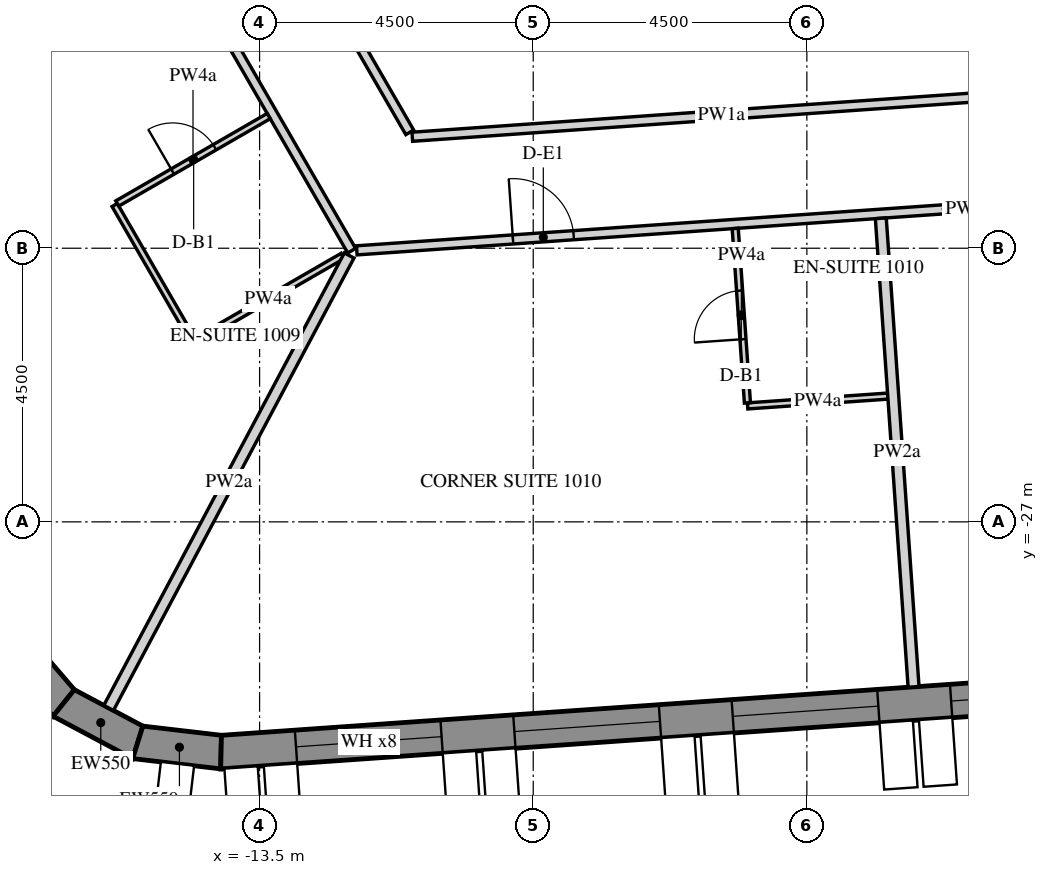
"""IFC4 building model, lengths in metres.
Left out: names, types, materials, properties, quantities, classifications, styles, units other than length and angle.
Written with IfcOpenShell. Run it as: python <this file> out.ifc"""

import sys

from ifc_helpers import new_model, si_unit, direction, frame, frame_2d, origin, place, context, subcontext, project, spatial, polyline, rectangle, outline, extrude, element, fill, save


model = new_model("IFC4")
c1 = context("Model", 3, precision=1e-05, world=origin(), true_north=direction((0.0, 1.0)))
c2 = subcontext(c1, "Body", "Model", "MODEL_VIEW")
j1 = project(units=[si_unit("LENGTHUNIT", "METRE"), si_unit("PLANEANGLEUNIT", "RADIAN")], contexts=[c1])
p1 = place(None, origin())
s1 = spatial("IfcSite", under=j1, at=p1, CompositionType="ELEMENT")
p2 = place(p1, origin())
s2 = spatial("IfcBuilding", under=s1, at=p2, CompositionType="ELEMENT")
p3 = place(p2, frame((0.0, 0.0, 135.0)))
s3 = spatial("IfcBuildingStorey", under=s2, at=p3, CompositionType="ELEMENT", Elevation=135.0)
p4 = place(p3, frame((-17.619, -28.932, -0.15), z_axis=(0.0, 0.0, 1.0), x_axis=(0.651621950847, -0.758543890078, 0.0)))
e1 = element("IfcWall", 1, at=p4, inside=s3, PredefinedType="SOLIDWALL", context=c2, shape_type="SweptSolid", body=[
    extrude(outline(polyline([(-0.026, -0.275), (1.431, -0.275), (1.327, 0.275), (0.026, 0.275), (-0.026, -0.275)])), origin(), (0.0, 0.0, 1.0), 3.9),
])
p5 = place(p3, frame((-16.721, -29.979, -0.15), z_axis=(0.0, 0.0, 1.0), x_axis=(0.882994189209, -0.469383917304, 0.0)))
e2 = element("IfcWall", 2, at=p5, inside=s3, PredefinedType="SOLIDWALL", context=c2, shape_type="SweptSolid", body=[
    extrude(outline(polyline([(-0.052, -0.275), (1.431, -0.275), (1.327, 0.275), (0.052, 0.275), (-0.052, -0.275)])), origin(), (0.0, 0.0, 1.0), 3.9),
])
p6 = place(p3, frame((-15.503, -30.626, -0.15), z_axis=(0.0, 0.0, 1.0), x_axis=(0.993232537394, -0.11614269956, 0.0)))
e3 = element("IfcWall", 3, at=p6, inside=s3, PredefinedType="SOLIDWALL", context=c2, shape_type="SweptSolid", body=[
    extrude(outline(polyline([(-0.052, -0.275), (1.405, -0.275), (1.353, 0.275), (0.052, 0.275), (-0.052, -0.275)])), origin(), (0.0, 0.0, 1.0), 3.9),
])
p7 = place(p3, frame((-14.134, -30.786, -0.15), z_axis=(0.0, 0.0, 1.0), x_axis=(0.997564037441, 0.069756657061, 0.0)))
e4 = element("IfcWall", 4, at=p7, inside=s3, PredefinedType="SOLIDWALL", context=c2, shape_type="SweptSolid", body=[
    extrude(outline(polyline([(-0.026, -0.275), (30.094, -0.275), (30.049, 0.275), (0.026, 0.275), (-0.026, -0.275)])), origin(), (0.0, 0.0, 1.0), 3.9),
])
p8 = place(p7, frame((1.236, 0.0, 1.05)))
e5 = element("IfcOpeningElement", 5, at=p8, cuts=e4, PredefinedType="OPENING", context=c2, shape_type="SweptSolid", body=[
    extrude(rectangle(XDim=2.4, YDim=2.4, at=frame_2d((1.2, 1.2))), frame((0.0, 0.285, 0.0), z_axis=(0.0, -1.0, 0.0), x_axis=(1.0, 0.0, 0.0)), (0.0, 0.0, 1.0), 0.57),
])
p9 = place(p7, frame((4.835, 0.0, 1.05)))
e6 = element("IfcOpeningElement", 6, at=p9, cuts=e4, PredefinedType="OPENING", context=c2, shape_type="SweptSolid", body=[
    extrude(rectangle(XDim=2.4, YDim=2.4, at=frame_2d((1.2, 1.2))), frame((0.0, 0.285, 0.0), z_axis=(0.0, -1.0, 0.0), x_axis=(1.0, 0.0, 0.0)), (0.0, 0.0, 1.0), 0.57),
])
p10 = place(p7, frame((8.436, 0.0, 1.05)))
e7 = element("IfcOpeningElement", 7, at=p10, cuts=e4, PredefinedType="OPENING", context=c2, shape_type="SweptSolid", body=[
    extrude(rectangle(XDim=2.4, YDim=2.4, at=frame_2d((1.2, 1.2))), frame((0.0, 0.285, 0.0), z_axis=(0.0, -1.0, 0.0), x_axis=(1.0, 0.0, 0.0)), (0.0, 0.0, 1.0), 0.57),
])
p11 = place(p7, frame((12.035, 0.0, 1.05)))
e8 = element("IfcOpeningElement", 8, at=p11, cuts=e4, PredefinedType="OPENING", context=c2, shape_type="SweptSolid", body=[
    extrude(rectangle(XDim=2.4, YDim=2.4, at=frame_2d((1.2, 1.2))), frame((0.0, 0.285, 0.0), z_axis=(0.0, -1.0, 0.0), x_axis=(1.0, 0.0, 0.0)), (0.0, 0.0, 1.0), 0.57),
])
p12 = place(p7, frame((15.635, 0.0, 1.05)))
e9 = element("IfcOpeningElement", 9, at=p12, cuts=e4, PredefinedType="OPENING", context=c2, shape_type="SweptSolid", body=[
    extrude(rectangle(XDim=2.4, YDim=2.4, at=frame_2d((1.2, 1.2))), frame((0.0, 0.285, 0.0), z_axis=(0.0, -1.0, 0.0), x_axis=(1.0, 0.0, 0.0)), (0.0, 0.0, 1.0), 0.57),
])
p13 = place(p7, frame((19.236, 0.0, 1.05)))
e10 = element("IfcOpeningElement", 10, at=p13, cuts=e4, PredefinedType="OPENING", context=c2, shape_type="SweptSolid", body=[
    extrude(rectangle(XDim=2.4, YDim=2.4, at=frame_2d((1.2, 1.2))), frame((0.0, 0.285, 0.0), z_axis=(0.0, -1.0, 0.0), x_axis=(1.0, 0.0, 0.0)), (0.0, 0.0, 1.0), 0.57),
])
p14 = place(p7, frame((22.835, 0.0, 1.05)))
e11 = element("IfcOpeningElement", 11, at=p14, cuts=e4, PredefinedType="OPENING", context=c2, shape_type="SweptSolid", body=[
    extrude(rectangle(XDim=2.4, YDim=2.4, at=frame_2d((1.2, 1.2))), frame((0.0, 0.285, 0.0), z_axis=(0.0, -1.0, 0.0), x_axis=(1.0, 0.0, 0.0)), (0.0, 0.0, 1.0), 0.57),
])
p15 = place(p7, frame((26.436, 0.0, 1.05)))
e12 = element("IfcOpeningElement", 12, at=p15, cuts=e4, PredefinedType="OPENING", context=c2, shape_type="SweptSolid", body=[
    extrude(rectangle(XDim=2.4, YDim=2.4, at=frame_2d((1.2, 1.2))), frame((0.0, 0.285, 0.0), z_axis=(0.0, -1.0, 0.0), x_axis=(1.0, 0.0, 0.0)), (0.0, 0.0, 1.0), 0.57),
])
p16 = place(p3, frame((-23.743, -2.175, 0.0), z_axis=(0.0, 0.0, 1.0), x_axis=(0.499992353047, -0.86602981871, 0.0)))
e13 = element("IfcWall", 13, at=p16, inside=s3, PredefinedType="PARTITIONING", context=c2, shape_type="SweptSolid", body=[
    extrude(rectangle(XDim=23.516, YDim=0.15, at=frame_2d((11.758, 0.0))), origin(), (0.0, 0.0, 1.0), 2.838),
])
p17 = place(p16, frame((10.099, 0.0, 0.0)))
e14 = element("IfcOpeningElement", 14, at=p17, cuts=e13, PredefinedType="OPENING", context=c2, shape_type="SweptSolid", body=[
    extrude(rectangle(XDim=1.0, YDim=2.1, at=frame_2d((0.5, 1.05))), frame((0.0, 0.085, 0.0), z_axis=(0.0, -1.0, 0.0), x_axis=(1.0, 0.0, 0.0)), (0.0, 0.0, 1.0), 0.17),
])
p18 = place(p16, frame((17.358, 0.0, 0.0)))
e15 = element("IfcOpeningElement", 15, at=p18, cuts=e13, PredefinedType="OPENING", context=c2, shape_type="SweptSolid", body=[
    extrude(rectangle(XDim=1.0, YDim=2.1, at=frame_2d((0.5, 1.05))), frame((0.0, 0.085, 0.0), z_axis=(0.0, -1.0, 0.0), x_axis=(1.0, 0.0, 0.0)), (0.0, 0.0, 1.0), 0.17),
])
p19 = place(p3, frame((-11.902, -22.535, 0.0), z_axis=(0.0, 0.0, 1.0), x_axis=(0.997563830208, 0.069759620556, 0.0)))
e16 = element("IfcWall", 16, at=p19, inside=s3, PredefinedType="PARTITIONING", context=c2, shape_type="SweptSolid", body=[
    extrude(rectangle(XDim=19.434, YDim=0.15, at=frame_2d((9.717, 0.0))), origin(), (0.0, 0.0, 1.0), 2.838),
])
p20 = place(p19, frame((2.575, 0.0, 0.0)))
e17 = element("IfcOpeningElement", 17, at=p20, cuts=e16, PredefinedType="OPENING", context=c2, shape_type="SweptSolid", body=[
    extrude(rectangle(XDim=1.0, YDim=2.1, at=frame_2d((0.5, 1.05))), frame((0.0, 0.085, 0.0), z_axis=(0.0, -1.0, 0.0), x_axis=(1.0, 0.0, 0.0)), (0.0, 0.0, 1.0), 0.17),
])
p21 = place(p19, frame((12.234, 0.0, 0.0)))
e18 = element("IfcOpeningElement", 18, at=p21, cuts=e16, PredefinedType="OPENING", context=c2, shape_type="SweptSolid", body=[
    extrude(rectangle(XDim=1.0, YDim=2.1, at=frame_2d((0.5, 1.05))), frame((0.0, 0.085, 0.0), z_axis=(0.0, -1.0, 0.0), x_axis=(1.0, 0.0, 0.0)), (0.0, 0.0, 1.0), 0.17),
])
p22 = place(p3, frame((-0.825, -19.956, 0.0), z_axis=(0.0, 0.0, 1.0), x_axis=(-0.997562587881, -0.069777383582, 0.0)))
e19 = element("IfcWall", 19, at=p22, inside=s3, PredefinedType="PARTITIONING", context=c2, shape_type="SweptSolid", body=[
    extrude(rectangle(XDim=10.189, YDim=0.15, at=frame_2d((5.094, 0.0))), origin(), (0.0, 0.0, 1.0), 2.838),
])
p23 = place(p3, frame((-11.031, -20.595, 0.0), z_axis=(0.0, 0.0, 1.0), x_axis=(-0.499987422378, 0.866032665356, 0.0)))
e20 = element("IfcWall", 20, at=p23, inside=s3, PredefinedType="PARTITIONING", context=c2, shape_type="SweptSolid", body=[
    extrude(rectangle(XDim=11.299, YDim=0.15, at=frame_2d((5.649, 0.0))), origin(), (0.0, 0.0, 1.0), 2.838),
])
p24 = place(p23, frame((5.199, 0.0, 0.0)))
e21 = element("IfcOpeningElement", 21, at=p24, cuts=e20, PredefinedType="OPENING", context=c2, shape_type="SweptSolid", body=[
    extrude(rectangle(XDim=0.9, YDim=2.1, at=frame_2d((0.45, 1.05))), frame((0.0, 0.085, 0.0), z_axis=(0.0, -1.0, 0.0), x_axis=(1.0, 0.0, 0.0)), (0.0, 0.0, 1.0), 0.17),
])
p25 = place(p3, frame((-12.133, -22.626, 0.0), z_axis=(0.0, 0.0, 1.0), x_axis=(-0.866014564827, -0.500018773155, 0.0)))
e22 = element("IfcWall", 22, at=p25, inside=s3, PredefinedType="PARTITIONING", context=c2, shape_type="SweptSolid", body=[
    extrude(rectangle(XDim=2.829, YDim=0.1, at=frame_2d((1.415, 0.0))), origin(), (0.0, 0.0, 1.0), 2.838),
])
p26 = place(p3, frame((-14.608, -23.998, 0.0), z_axis=(0.0, 0.0, 1.0), x_axis=(-0.499990435942, 0.866030925526, 0.0)))
e23 = element("IfcWall", 23, at=p26, inside=s3, PredefinedType="PARTITIONING", context=c2, shape_type="SweptSolid", body=[
    extrude(rectangle(XDim=2.55, YDim=0.1, at=frame_2d((1.275, 0.0))), origin(), (0.0, 0.0, 1.0), 2.838),
])
p27 = place(p3, frame((-15.84, -21.764, 0.0), z_axis=(0.0, 0.0, 1.0), x_axis=(0.866039941686, 0.499974818771, 0.0)))
e24 = element("IfcWall", 24, at=p27, inside=s3, PredefinedType="PARTITIONING", context=c2, shape_type="SweptSolid", body=[
    extrude(rectangle(XDim=2.875, YDim=0.1, at=frame_2d((1.438, 0.0))), origin(), (0.0, 0.0, 1.0), 2.838),
])
p28 = place(p27, frame((1.05, 0.0, 0.0)))
e25 = element("IfcOpeningElement", 25, at=p28, cuts=e24, PredefinedType="OPENING", context=c2, shape_type="SweptSolid", body=[
    extrude(rectangle(XDim=0.8, YDim=2.1, at=frame_2d((0.4, 1.05))), frame((0.0, 0.06, 0.0), z_axis=(0.0, -1.0, 0.0), x_axis=(1.0, 0.0, 0.0)), (0.0, 0.0, 1.0), 0.12),
])
p29 = place(p3, frame((-15.983, -30.059, 0.0), z_axis=(0.0, 0.0, 1.0), x_axis=(0.469475065364, 0.882945730496, 0.0)))
e26 = element("IfcWall", 26, at=p29, inside=s3, PredefinedType="PARTITIONING", context=c2, shape_type="SweptSolid", body=[
    extrude(rectangle(XDim=8.427, YDim=0.18, at=frame_2d((4.213, 0.0))), origin(), (0.0, 0.0, 1.0), 2.838),
])
p30 = place(p3, frame((-3.17, -24.932, 0.0), z_axis=(0.0, 0.0, 1.0), x_axis=(-0.997564338377, -0.069752353356, 0.0)))
e27 = element("IfcWall", 27, at=p30, inside=s3, PredefinedType="PARTITIONING", context=c2, shape_type="SweptSolid", body=[
    extrude(rectangle(XDim=2.31, YDim=0.1, at=frame_2d((1.155, 0.0))), origin(), (0.0, 0.0, 1.0), 2.838),
])
p31 = place(p3, frame((-5.478, -25.043, 0.0), z_axis=(0.0, 0.0, 1.0), x_axis=(-0.069714207611, 0.997567004896, 0.0)))
e28 = element("IfcWall", 28, at=p31, inside=s3, PredefinedType="PARTITIONING", context=c2, shape_type="SweptSolid", body=[
    extrude(rectangle(XDim=2.875, YDim=0.1, at=frame_2d((1.438, 0.0))), origin(), (0.0, 0.0, 1.0), 2.838),
])
p32 = place(p31, frame((1.05, 0.0, 0.0)))
e29 = element("IfcOpeningElement", 29, at=p32, cuts=e28, PredefinedType="OPENING", context=c2, shape_type="SweptSolid", body=[
    extrude(rectangle(XDim=0.8, YDim=2.1, at=frame_2d((0.4, 1.05))), frame((0.0, 0.06, 0.0), z_axis=(0.0, -1.0, 0.0), x_axis=(1.0, 0.0, 0.0)), (0.0, 0.0, 1.0), 0.12),
])
p33 = place(p3, frame((-2.745, -29.714, 0.0), z_axis=(0.0, 0.0, 1.0), x_axis=(-0.069748931501, 0.997564577636, 0.0)))
e30 = element("IfcWall", 30, at=p33, inside=s3, PredefinedType="PARTITIONING", context=c2, shape_type="SweptSolid", body=[
    extrude(rectangle(XDim=7.725, YDim=0.18, at=frame_2d((3.863, 0.0))), origin(), (0.0, 0.0, 1.0), 2.838),
])
p34 = place(p8, frame((0.0, 0.205, 0.0)))
e31 = element("IfcWindow", 31, at=p34, inside=s3, PartitioningType="DOUBLE_PANEL_VERTICAL", PredefinedType="WINDOW", context=c2, shape_type="SweptSolid", body=[
    extrude(rectangle(XDim=2.4, YDim=2.4, at=frame_2d((1.2, 1.2))), frame((0.0, 0.03, 0.0), z_axis=(0.0, -1.0, 0.0), x_axis=(1.0, 0.0, 0.0)), (0.0, 0.0, 1.0), 0.06),
])
fill(e5, e31)
p35 = place(p9, frame((0.0, 0.205, 0.0)))
e32 = element("IfcWindow", 32, at=p35, inside=s3, PartitioningType="DOUBLE_PANEL_VERTICAL", PredefinedType="WINDOW", context=c2, shape_type="SweptSolid", body=[
    extrude(rectangle(XDim=2.4, YDim=2.4, at=frame_2d((1.2, 1.2))), frame((0.0, 0.03, 0.0), z_axis=(0.0, -1.0, 0.0), x_axis=(1.0, 0.0, 0.0)), (0.0, 0.0, 1.0), 0.06),
])
fill(e6, e32)
p36 = place(p10, frame((0.0, 0.205, 0.0)))
e33 = element("IfcWindow", 33, at=p36, inside=s3, PartitioningType="DOUBLE_PANEL_VERTICAL", PredefinedType="WINDOW", context=c2, shape_type="SweptSolid", body=[
    extrude(rectangle(XDim=2.4, YDim=2.4, at=frame_2d((1.2, 1.2))), frame((0.0, 0.03, 0.0), z_axis=(0.0, -1.0, 0.0), x_axis=(1.0, 0.0, 0.0)), (0.0, 0.0, 1.0), 0.06),
])
fill(e7, e33)
p37 = place(p11, frame((0.0, 0.205, 0.0)))
e34 = element("IfcWindow", 34, at=p37, inside=s3, PartitioningType="DOUBLE_PANEL_VERTICAL", PredefinedType="WINDOW", context=c2, shape_type="SweptSolid", body=[
    extrude(rectangle(XDim=2.4, YDim=2.4, at=frame_2d((1.2, 1.2))), frame((0.0, 0.03, 0.0), z_axis=(0.0, -1.0, 0.0), x_axis=(1.0, 0.0, 0.0)), (0.0, 0.0, 1.0), 0.06),
])
fill(e8, e34)
p38 = place(p28, origin())
e35 = element("IfcDoor", 35, at=p38, inside=s3, OperationType="SINGLE_SWING_LEFT", PredefinedType="DOOR", context=c2, shape_type="SweptSolid", body=[
    extrude(rectangle(XDim=0.8, YDim=2.1, at=frame_2d((0.4, 1.05))), frame((0.0, 0.025, 0.0), z_axis=(0.0, -1.0, 0.0), x_axis=(1.0, 0.0, 0.0)), (0.0, 0.0, 1.0), 0.05),
])
fill(e25, e35)
p39 = place(p20, origin())
e36 = element("IfcDoor", 36, at=p39, inside=s3, OperationType="SINGLE_SWING_RIGHT", PredefinedType="DOOR", context=c2, shape_type="SweptSolid", body=[
    extrude(rectangle(XDim=1.0, YDim=2.1, at=frame_2d((0.5, 1.05))), frame((0.0, 0.025, 0.0), z_axis=(0.0, -1.0, 0.0), x_axis=(1.0, 0.0, 0.0)), (0.0, 0.0, 1.0), 0.05),
])
fill(e17, e36)
p40 = place(p32, origin())
e37 = element("IfcDoor", 37, at=p40, inside=s3, OperationType="SINGLE_SWING_LEFT", PredefinedType="DOOR", context=c2, shape_type="SweptSolid", body=[
    extrude(rectangle(XDim=0.8, YDim=2.1, at=frame_2d((0.4, 1.05))), frame((0.0, 0.025, 0.0), z_axis=(0.0, -1.0, 0.0), x_axis=(1.0, 0.0, 0.0)), (0.0, 0.0, 1.0), 0.05),
])
fill(e29, e37)
save(model, sys.argv[1])
